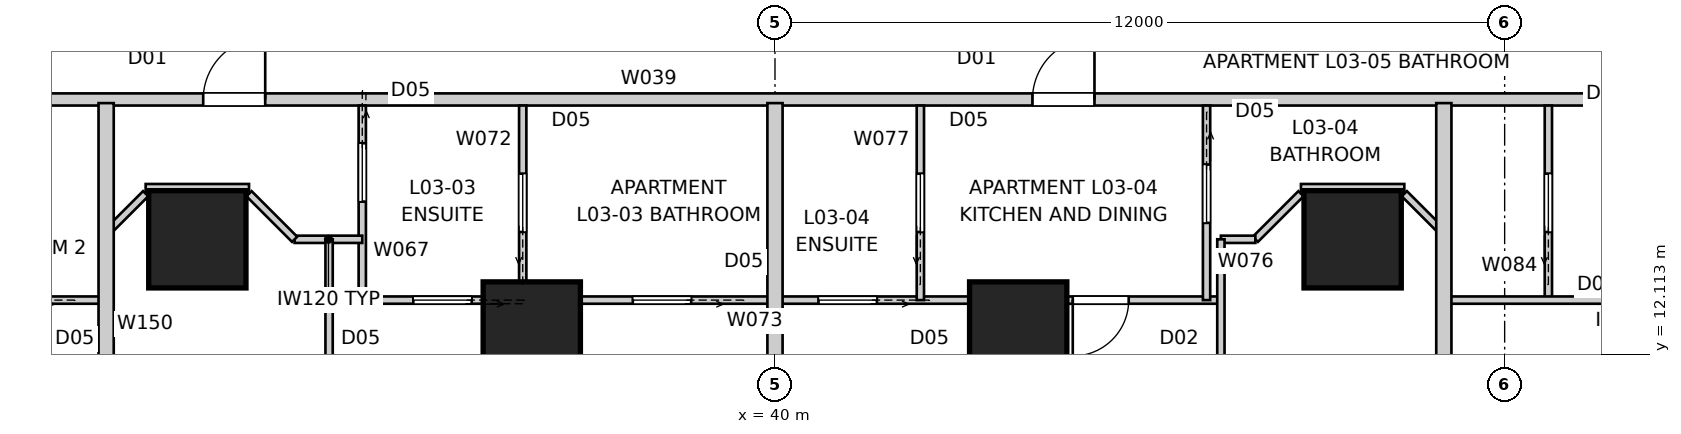
"""IFC4 building model, lengths in metres.
Left out: names, types, materials, properties, quantities, classifications, styles, units other than length and angle.
Written with IfcOpenShell. Run it as: python <this file> out.ifc"""

import sys

from ifc_helpers import new_model, si_unit, direction, frame, frame_2d, origin, origin_2d, place, context, subcontext, project, spatial, rectangle, extrude, element, fill, save


model = new_model("IFC4")
c1 = context("Model", 3, precision=1e-05, world=origin(), true_north=direction((0.0, 1.0)))
c2 = subcontext(c1, "Body", "Model", "MODEL_VIEW")
j1 = project(units=[si_unit("LENGTHUNIT", "METRE"), si_unit("PLANEANGLEUNIT", "RADIAN")], contexts=[c1])
p1 = place(None, origin())
s1 = spatial("IfcSite", under=j1, at=p1, CompositionType="ELEMENT")
p2 = place(p1, origin())
s2 = spatial("IfcBuilding", under=s1, at=p2, CompositionType="ELEMENT")
p3 = place(p2, frame((0.0, 0.0, 15.0)))
s3 = spatial("IfcBuildingStorey", under=s2, at=p3, CompositionType="ELEMENT", Elevation=15.0)
for number, where, z_axis, x_axis in (
    (1, (30.5, 14.0, 0.0), (0.0, 0.0, 1.0), (1.0, 0.0, 0.0)),
    (2, (36.0, 12.5, 0.0), (0.0, 0.0, 1.0), (1.0, 0.0, 0.0)),
    (3, (44.0, 12.5, 0.0), (0.0, 0.0, 1.0), (1.0, 0.0, 0.0)),
    (4, (49.5, 14.0, 0.0), (0.0, 0.0, 1.0), (1.0, 0.0, 0.0)),
):
    element("IfcColumn", number, at=place(p3, frame(where, z_axis=z_axis, x_axis=x_axis)), inside=s3, PredefinedType="COLUMN", context=c2, shape_type="SweptSolid", body=[
        extrude(rectangle(XDim=1.6, YDim=1.6, at=origin_2d()), origin(), (0.0, 0.0, 1.0), 3.4),
    ])
p4 = place(p3, frame((25.5, 16.3, 0.0), z_axis=(0.0, 0.0, 1.0), x_axis=(1.0, 0.0, 0.0)))
e5 = element("IfcWall", 5, at=p4, inside=s3, PredefinedType="PARTITIONING", context=c2, shape_type="SweptSolid", body=[
    extrude(rectangle(XDim=29.0, YDim=0.2, at=frame_2d((14.5, 0.0))), origin(), (0.0, 0.0, 1.0), 3.25),
])
p5 = place(p4, frame((18.734, 0.0, 0.0)))
e6 = element("IfcOpeningElement", 6, at=p5, cuts=e5, PredefinedType="OPENING", context=c2, shape_type="SweptSolid", body=[
    extrude(rectangle(XDim=1.02, YDim=2.34, at=frame_2d((0.51, 1.17))), frame((0.0, 0.11, 0.0), z_axis=(0.0, -1.0, 0.0), x_axis=(1.0, 0.0, 0.0)), (0.0, 0.0, 1.0), 0.22),
])
p6 = place(p4, frame((5.096, 0.0, 0.0)))
e7 = element("IfcOpeningElement", 7, at=p6, cuts=e5, PredefinedType="OPENING", context=c2, shape_type="SweptSolid", body=[
    extrude(rectangle(XDim=1.02, YDim=2.34, at=frame_2d((0.51, 1.17))), frame((0.0, 0.11, 0.0), z_axis=(0.0, -1.0, 0.0), x_axis=(1.0, 0.0, 0.0)), (0.0, 0.0, 1.0), 0.22),
])
p7 = place(p4, frame((0.815, 0.0, 0.0)))
e8 = element("IfcOpeningElement", 8, at=p7, cuts=e5, PredefinedType="OPENING", context=c2, shape_type="SweptSolid", body=[
    extrude(rectangle(XDim=1.02, YDim=2.1, at=frame_2d((0.51, 1.05))), frame((0.0, 0.11, 0.0), z_axis=(0.0, -1.0, 0.0), x_axis=(1.0, 0.0, 0.0)), (0.0, 0.0, 1.0), 0.22),
])
p8 = place(p3, frame((29.0, 4.0, 0.0), z_axis=(0.0, 0.0, 1.0), x_axis=(0.0, 1.0, 0.0)))
e9 = element("IfcWall", 9, at=p8, inside=s3, PredefinedType="PARTITIONING", context=c2, shape_type="SweptSolid", body=[
    extrude(rectangle(XDim=12.24, YDim=0.25, at=frame_2d((6.12, 0.0))), origin(), (0.0, 0.0, 1.0), 3.25),
])
p9 = place(p8, frame((4.04, 0.0, 0.0)))
e10 = element("IfcOpeningElement", 10, at=p9, cuts=e9, PredefinedType="OPENING", context=c2, shape_type="SweptSolid", body=[
    extrude(rectangle(XDim=0.92, YDim=2.34, at=frame_2d((0.46, 1.17))), frame((0.0, 0.135, 0.0), z_axis=(0.0, -1.0, 0.0), x_axis=(1.0, 0.0, 0.0)), (0.0, 0.0, 1.0), 0.27),
])
p10 = place(p3, frame((40.0, 4.0, 0.0), z_axis=(0.0, 0.0, 1.0), x_axis=(0.0, 1.0, 0.0)))
e11 = element("IfcWall", 11, at=p10, inside=s3, PredefinedType="PARTITIONING", context=c2, shape_type="SweptSolid", body=[
    extrude(rectangle(XDim=8.5, YDim=0.25, at=frame_2d((4.25, 0.0))), origin(), (0.0, 0.0, 1.0), 3.25),
])
p11 = place(p3, frame((40.0, 12.5, 0.0), z_axis=(0.0, 0.0, 1.0), x_axis=(0.0, 1.0, 0.0)))
e12 = element("IfcWall", 12, at=p11, inside=s3, PredefinedType="PARTITIONING", context=c2, shape_type="SweptSolid", body=[
    extrude(rectangle(XDim=3.74, YDim=0.25, at=frame_2d((1.87, 0.0))), origin(), (0.0, 0.0, 1.0), 2.796),
])
p12 = place(p3, frame((51.0, 4.0, 0.0), z_axis=(0.0, 0.0, 1.0), x_axis=(0.0, 1.0, 0.0)))
e13 = element("IfcWall", 13, at=p12, inside=s3, PredefinedType="PARTITIONING", context=c2, shape_type="SweptSolid", body=[
    extrude(rectangle(XDim=12.24, YDim=0.25, at=frame_2d((6.12, 0.0))), origin(), (0.0, 0.0, 1.0), 3.25),
])
p13 = place(p3, frame((29.0, 13.0, 0.0), z_axis=(0.0, 0.0, 1.0), x_axis=(-1.0, 0.0, 0.0)))
e14 = element("IfcWall", 14, at=p13, inside=s3, PredefinedType="PARTITIONING", context=c2, shape_type="SweptSolid", body=[
    extrude(rectangle(XDim=6.0, YDim=0.12, at=frame_2d((3.0, 0.0))), origin(), (0.0, 0.0, 1.0), 3.25),
])
p14 = place(p13, frame((1.378, 0.0, 0.0)))
e15 = element("IfcOpeningElement", 15, at=p14, cuts=e14, PredefinedType="OPENING", context=c2, shape_type="SweptSolid", body=[
    extrude(rectangle(XDim=0.96, YDim=2.1, at=frame_2d((0.48, 1.05))), frame((0.0, 0.07, 0.0), z_axis=(0.0, -1.0, 0.0), x_axis=(1.0, 0.0, 0.0)), (0.0, 0.0, 1.0), 0.14),
])
p15 = place(p3, frame((33.212, 16.2, 0.0), z_axis=(0.0, 0.0, 1.0), x_axis=(0.0, -1.0, 0.0)))
e16 = element("IfcWall", 16, at=p15, inside=s3, PredefinedType="PARTITIONING", context=c2, shape_type="SweptSolid", body=[
    extrude(rectangle(XDim=3.2, YDim=0.12, at=frame_2d((1.6, 0.0))), origin(), (0.0, 0.0, 1.0), 3.25),
])
p16 = place(p15, frame((0.62, 0.0, 0.0)))
e17 = element("IfcOpeningElement", 17, at=p16, cuts=e16, PredefinedType="OPENING", context=c2, shape_type="SweptSolid", body=[
    extrude(rectangle(XDim=0.96, YDim=2.1, at=frame_2d((0.48, 1.05))), frame((0.0, 0.07, 0.0), z_axis=(0.0, -1.0, 0.0), x_axis=(1.0, 0.0, 0.0)), (0.0, 0.0, 1.0), 0.14),
])
p17 = place(p3, frame((33.212, 14.0, 0.0), z_axis=(0.0, 0.0, 1.0), x_axis=(-1.0, 0.0, 0.0)))
e18 = element("IfcWall", 18, at=p17, inside=s3, PredefinedType="PARTITIONING", context=c2, shape_type="SweptSolid", body=[
    extrude(rectangle(XDim=1.112, YDim=0.12, at=frame_2d((0.556, 0.0))), origin(), (0.0, 0.0, 1.0), 3.25),
])
p18 = place(p3, frame((32.1, 14.0, 0.0), z_axis=(0.0, 0.0, 1.0), x_axis=(-0.707106781187, 0.707106781187, 0.0)))
e19 = element("IfcWall", 19, at=p18, inside=s3, PredefinedType="PARTITIONING", context=c2, shape_type="SweptSolid", body=[
    extrude(rectangle(XDim=1.061, YDim=0.12, at=frame_2d((0.53, 0.0))), origin(), (0.0, 0.0, 1.0), 3.25),
])
p19 = place(p3, frame((31.35, 14.85, 0.0), z_axis=(0.0, 0.0, 1.0), x_axis=(-1.0, 0.0, 0.0)))
e20 = element("IfcWall", 20, at=p19, inside=s3, PredefinedType="PARTITIONING", context=c2, shape_type="SweptSolid", body=[
    extrude(rectangle(XDim=1.7, YDim=0.12, at=frame_2d((0.85, 0.0))), origin(), (0.0, 0.0, 1.0), 3.25),
])
p20 = place(p3, frame((29.65, 14.75, 0.0), z_axis=(0.0, 0.0, 1.0), x_axis=(-0.707106781187, -0.707106781187, 0.0)))
e21 = element("IfcWall", 21, at=p20, inside=s3, PredefinedType="PARTITIONING", context=c2, shape_type="SweptSolid", body=[
    extrude(rectangle(XDim=0.919, YDim=0.12, at=frame_2d((0.459, 0.0))), origin(), (0.0, 0.0, 1.0), 3.25),
])
p21 = place(p3, frame((35.851, 13.0, 0.0), z_axis=(0.0, 0.0, 1.0), x_axis=(0.0, 1.0, 0.0)))
e22 = element("IfcWall", 22, at=p21, inside=s3, PredefinedType="PARTITIONING", context=c2, shape_type="SweptSolid", body=[
    extrude(rectangle(XDim=3.2, YDim=0.12, at=frame_2d((1.6, 0.0))), origin(), (0.0, 0.0, 1.0), 3.25),
])
p22 = place(p21, frame((1.12, 0.0, 0.0)))
e23 = element("IfcOpeningElement", 23, at=p22, cuts=e22, PredefinedType="OPENING", context=c2, shape_type="SweptSolid", body=[
    extrude(rectangle(XDim=0.96, YDim=2.1, at=frame_2d((0.48, 1.05))), frame((0.0, 0.07, 0.0), z_axis=(0.0, -1.0, 0.0), x_axis=(1.0, 0.0, 0.0)), (0.0, 0.0, 1.0), 0.14),
])
p23 = place(p3, frame((47.333, 13.0, 0.0), z_axis=(0.0, 0.0, 1.0), x_axis=(-1.0, 0.0, 0.0)))
e24 = element("IfcWall", 24, at=p23, inside=s3, PredefinedType="PARTITIONING", context=c2, shape_type="SweptSolid", body=[
    extrude(rectangle(XDim=14.121, YDim=0.12, at=frame_2d((7.061, 0.0))), origin(), (0.0, 0.0, 1.0), 2.549),
])
p24 = place(p23, frame((1.516, 0.0, 0.0)))
e25 = element("IfcOpeningElement", 25, at=p24, cuts=e24, PredefinedType="OPENING", context=c2, shape_type="SweptSolid", body=[
    extrude(rectangle(XDim=0.92, YDim=2.34, at=frame_2d((0.46, 1.17))), frame((0.0, 0.07, 0.0), z_axis=(0.0, -1.0, 0.0), x_axis=(1.0, 0.0, 0.0)), (0.0, 0.0, 1.0), 0.14),
])
p25 = place(p23, frame((5.658, 0.0, 0.0)))
e26 = element("IfcOpeningElement", 26, at=p25, cuts=e24, PredefinedType="OPENING", context=c2, shape_type="SweptSolid", body=[
    extrude(rectangle(XDim=0.96, YDim=2.1, at=frame_2d((0.48, 1.05))), frame((0.0, 0.07, 0.0), z_axis=(0.0, -1.0, 0.0), x_axis=(1.0, 0.0, 0.0)), (0.0, 0.0, 1.0), 0.14),
])
p26 = place(p23, frame((12.322, 0.0, 0.0)))
e27 = element("IfcOpeningElement", 27, at=p26, cuts=e24, PredefinedType="OPENING", context=c2, shape_type="SweptSolid", body=[
    extrude(rectangle(XDim=0.96, YDim=2.1, at=frame_2d((0.48, 1.05))), frame((0.0, 0.07, 0.0), z_axis=(0.0, -1.0, 0.0), x_axis=(1.0, 0.0, 0.0)), (0.0, 0.0, 1.0), 0.14),
])
p27 = place(p23, frame((8.712, 0.0, 0.0)))
e28 = element("IfcOpeningElement", 28, at=p27, cuts=e24, PredefinedType="OPENING", context=c2, shape_type="SweptSolid", body=[
    extrude(rectangle(XDim=0.96, YDim=2.1, at=frame_2d((0.48, 1.05))), frame((0.0, 0.07, 0.0), z_axis=(0.0, -1.0, 0.0), x_axis=(1.0, 0.0, 0.0)), (0.0, 0.0, 1.0), 0.14),
])
p28 = place(p3, frame((32.667, 14.0, 0.0), z_axis=(0.0, 0.0, 1.0), x_axis=(0.0, -1.0, 0.0)))
e29 = element("IfcWall", 29, at=p28, inside=s3, PredefinedType="PARTITIONING", context=c2, shape_type="SweptSolid", body=[
    extrude(rectangle(XDim=9.96, YDim=0.12, at=frame_2d((4.98, 0.0))), origin(), (0.0, 0.0, 1.0), 3.25),
])
p29 = place(p28, frame((4.54, 0.0, 0.0)))
e30 = element("IfcOpeningElement", 30, at=p29, cuts=e29, PredefinedType="OPENING", context=c2, shape_type="SweptSolid", body=[
    extrude(rectangle(XDim=0.92, YDim=2.34, at=frame_2d((0.46, 1.17))), frame((0.0, 0.07, 0.0), z_axis=(0.0, -1.0, 0.0), x_axis=(1.0, 0.0, 0.0)), (0.0, 0.0, 1.0), 0.14),
])
p30 = place(p3, frame((36.333, 4.04, 0.0), z_axis=(0.0, 0.0, 1.0), x_axis=(0.0, 1.0, 0.0)))
e31 = element("IfcWall", 31, at=p30, inside=s3, PredefinedType="PARTITIONING", context=c2, shape_type="SweptSolid", body=[
    extrude(rectangle(XDim=8.96, YDim=0.12, at=frame_2d((4.48, 0.0))), origin(), (0.0, 0.0, 1.0), 3.25),
])
p31 = place(p3, frame((47.098, 16.2, 0.0), z_axis=(0.0, 0.0, 1.0), x_axis=(0.0, -1.0, 0.0)))
e32 = element("IfcWall", 32, at=p31, inside=s3, PredefinedType="PARTITIONING", context=c2, shape_type="SweptSolid", body=[
    extrude(rectangle(XDim=3.2, YDim=0.12, at=frame_2d((1.6, 0.0))), origin(), (0.0, 0.0, 1.0), 3.25),
])
p32 = place(p31, frame((0.97, 0.0, 0.0)))
e33 = element("IfcOpeningElement", 33, at=p32, cuts=e32, PredefinedType="OPENING", context=c2, shape_type="SweptSolid", body=[
    extrude(rectangle(XDim=0.96, YDim=2.1, at=frame_2d((0.48, 1.05))), frame((0.0, 0.07, 0.0), z_axis=(0.0, -1.0, 0.0), x_axis=(1.0, 0.0, 0.0)), (0.0, 0.0, 1.0), 0.14),
])
p33 = place(p3, frame((42.391, 13.0, 0.0), z_axis=(0.0, 0.0, 1.0), x_axis=(0.0, 1.0, 0.0)))
e34 = element("IfcWall", 34, at=p33, inside=s3, PredefinedType="PARTITIONING", context=c2, shape_type="SweptSolid", body=[
    extrude(rectangle(XDim=3.2, YDim=0.12, at=frame_2d((1.6, 0.0))), origin(), (0.0, 0.0, 1.0), 3.25),
])
p34 = place(p33, frame((1.12, 0.0, 0.0)))
e35 = element("IfcOpeningElement", 35, at=p34, cuts=e34, PredefinedType="OPENING", context=c2, shape_type="SweptSolid", body=[
    extrude(rectangle(XDim=0.96, YDim=2.1, at=frame_2d((0.48, 1.05))), frame((0.0, 0.07, 0.0), z_axis=(0.0, -1.0, 0.0), x_axis=(1.0, 0.0, 0.0)), (0.0, 0.0, 1.0), 0.14),
])
p35 = place(p3, frame((51.0, 14.1, 0.0), z_axis=(0.0, 0.0, 1.0), x_axis=(-0.707106781187, 0.707106781187, 0.0)))
e36 = element("IfcWall", 36, at=p35, inside=s3, PredefinedType="PARTITIONING", context=c2, shape_type="SweptSolid", body=[
    extrude(rectangle(XDim=0.919, YDim=0.12, at=frame_2d((0.459, 0.0))), origin(), (0.0, 0.0, 1.0), 3.25),
])
p36 = place(p3, frame((50.35, 14.85, 0.0), z_axis=(0.0, 0.0, 1.0), x_axis=(-1.0, 0.0, 0.0)))
e37 = element("IfcWall", 37, at=p36, inside=s3, PredefinedType="PARTITIONING", context=c2, shape_type="SweptSolid", body=[
    extrude(rectangle(XDim=1.7, YDim=0.12, at=frame_2d((0.85, 0.0))), origin(), (0.0, 0.0, 1.0), 3.25),
])
p37 = place(p3, frame((48.65, 14.75, 0.0), z_axis=(0.0, 0.0, 1.0), x_axis=(-0.707106781187, -0.707106781187, 0.0)))
e38 = element("IfcWall", 38, at=p37, inside=s3, PredefinedType="PARTITIONING", context=c2, shape_type="SweptSolid", body=[
    extrude(rectangle(XDim=1.061, YDim=0.12, at=frame_2d((0.53, 0.0))), origin(), (0.0, 0.0, 1.0), 3.25),
])
p38 = place(p3, frame((47.9, 14.0, 0.0), z_axis=(0.0, 0.0, 1.0), x_axis=(-1.0, 0.0, 0.0)))
e39 = element("IfcWall", 39, at=p38, inside=s3, PredefinedType="PARTITIONING", context=c2, shape_type="SweptSolid", body=[
    extrude(rectangle(XDim=0.567, YDim=0.12, at=frame_2d((0.283, 0.0))), origin(), (0.0, 0.0, 1.0), 3.25),
])
p39 = place(p3, frame((47.333, 14.0, 0.0), z_axis=(0.0, 0.0, 1.0), x_axis=(0.0, -1.0, 0.0)))
e40 = element("IfcWall", 40, at=p39, inside=s3, PredefinedType="PARTITIONING", context=c2, shape_type="SweptSolid", body=[
    extrude(rectangle(XDim=9.96, YDim=0.12, at=frame_2d((4.98, 0.0))), origin(), (0.0, 0.0, 1.0), 3.25),
])
p40 = place(p39, frame((5.015, 0.0, 0.0)))
e41 = element("IfcOpeningElement", 41, at=p40, cuts=e40, PredefinedType="OPENING", context=c2, shape_type="SweptSolid", body=[
    extrude(rectangle(XDim=0.92, YDim=2.34, at=frame_2d((0.46, 1.17))), frame((0.0, 0.07, 0.0), z_axis=(0.0, -1.0, 0.0), x_axis=(1.0, 0.0, 0.0)), (0.0, 0.0, 1.0), 0.14),
])
p41 = place(p3, frame((43.667, 13.0, 0.0), z_axis=(0.0, 0.0, 1.0), x_axis=(0.0, -1.0, 0.0)))
e42 = element("IfcWall", 42, at=p41, inside=s3, PredefinedType="PARTITIONING", context=c2, shape_type="SweptSolid", body=[
    extrude(rectangle(XDim=8.96, YDim=0.12, at=frame_2d((4.48, 0.0))), origin(), (0.0, 0.0, 1.0), 3.25),
])
p42 = place(p3, frame((52.719, 13.0, 0.0), z_axis=(0.0, 0.0, 1.0), x_axis=(0.0, 1.0, 0.0)))
e43 = element("IfcWall", 43, at=p42, inside=s3, PredefinedType="PARTITIONING", context=c2, shape_type="SweptSolid", body=[
    extrude(rectangle(XDim=3.2, YDim=0.12, at=frame_2d((1.6, 0.0))), origin(), (0.0, 0.0, 1.0), 3.25),
])
p43 = place(p42, frame((1.12, 0.0, 0.0)))
e44 = element("IfcOpeningElement", 44, at=p43, cuts=e43, PredefinedType="OPENING", context=c2, shape_type="SweptSolid", body=[
    extrude(rectangle(XDim=0.96, YDim=2.1, at=frame_2d((0.48, 1.05))), frame((0.0, 0.07, 0.0), z_axis=(0.0, -1.0, 0.0), x_axis=(1.0, 0.0, 0.0)), (0.0, 0.0, 1.0), 0.14),
])
p44 = place(p3, frame((57.0, 13.0, 0.0), z_axis=(0.0, 0.0, 1.0), x_axis=(-1.0, 0.0, 0.0)))
e45 = element("IfcWall", 45, at=p44, inside=s3, PredefinedType="PARTITIONING", context=c2, shape_type="SweptSolid", body=[
    extrude(rectangle(XDim=6.0, YDim=0.12, at=frame_2d((3.0, 0.0))), origin(), (0.0, 0.0, 1.0), 3.25),
])
p45 = place(p5, origin())
e46 = element("IfcDoor", 46, at=p45, inside=s3, OperationType="SINGLE_SWING_RIGHT", PredefinedType="DOOR", context=c2, shape_type="SweptSolid", body=[
    extrude(rectangle(XDim=1.02, YDim=2.34, at=frame_2d((0.51, 1.17))), frame((0.0, 0.025, 0.0), z_axis=(0.0, -1.0, 0.0), x_axis=(1.0, 0.0, 0.0)), (0.0, 0.0, 1.0), 0.05),
])
fill(e6, e46)
p46 = place(p6, origin())
e47 = element("IfcDoor", 47, at=p46, inside=s3, OperationType="SINGLE_SWING_RIGHT", PredefinedType="DOOR", context=c2, shape_type="SweptSolid", body=[
    extrude(rectangle(XDim=1.02, YDim=2.34, at=frame_2d((0.51, 1.17))), frame((0.0, 0.025, 0.0), z_axis=(0.0, -1.0, 0.0), x_axis=(1.0, 0.0, 0.0)), (0.0, 0.0, 1.0), 0.05),
])
fill(e7, e47)
p47 = place(p24, origin())
e48 = element("IfcDoor", 48, at=p47, inside=s3, OperationType="SINGLE_SWING_RIGHT", PredefinedType="DOOR", context=c2, shape_type="SweptSolid", body=[
    extrude(rectangle(XDim=0.92, YDim=2.34, at=frame_2d((0.46, 1.17))), frame((0.0, 0.025, 0.0), z_axis=(0.0, -1.0, 0.0), x_axis=(1.0, 0.0, 0.0)), (0.0, 0.0, 1.0), 0.05),
])
fill(e25, e48)
p48 = place(p32, origin())
e49 = element("IfcDoor", 49, at=p48, inside=s3, OperationType="SLIDING_TO_LEFT", PredefinedType="DOOR", context=c2, shape_type="SweptSolid", body=[
    extrude(rectangle(XDim=0.96, YDim=2.1, at=frame_2d((0.48, 1.05))), frame((0.0, 0.025, 0.0), z_axis=(0.0, -1.0, 0.0), x_axis=(1.0, 0.0, 0.0)), (0.0, 0.0, 1.0), 0.05),
])
fill(e33, e49)
p49 = place(p34, origin())
e50 = element("IfcDoor", 50, at=p49, inside=s3, OperationType="SLIDING_TO_LEFT", PredefinedType="DOOR", context=c2, shape_type="SweptSolid", body=[
    extrude(rectangle(XDim=0.96, YDim=2.1, at=frame_2d((0.48, 1.05))), frame((0.0, 0.025, 0.0), z_axis=(0.0, -1.0, 0.0), x_axis=(1.0, 0.0, 0.0)), (0.0, 0.0, 1.0), 0.05),
])
fill(e35, e50)
p50 = place(p16, origin())
e51 = element("IfcDoor", 51, at=p50, inside=s3, OperationType="SLIDING_TO_LEFT", PredefinedType="DOOR", context=c2, shape_type="SweptSolid", body=[
    extrude(rectangle(XDim=0.96, YDim=2.1, at=frame_2d((0.48, 1.05))), frame((0.0, 0.025, 0.0), z_axis=(0.0, -1.0, 0.0), x_axis=(1.0, 0.0, 0.0)), (0.0, 0.0, 1.0), 0.05),
])
fill(e17, e51)
p51 = place(p43, origin())
e52 = element("IfcDoor", 52, at=p51, inside=s3, OperationType="SLIDING_TO_LEFT", PredefinedType="DOOR", context=c2, shape_type="SweptSolid", body=[
    extrude(rectangle(XDim=0.96, YDim=2.1, at=frame_2d((0.48, 1.05))), frame((0.0, 0.025, 0.0), z_axis=(0.0, -1.0, 0.0), x_axis=(1.0, 0.0, 0.0)), (0.0, 0.0, 1.0), 0.05),
])
fill(e44, e52)
p52 = place(p25, origin())
e53 = element("IfcDoor", 53, at=p52, inside=s3, OperationType="SLIDING_TO_LEFT", PredefinedType="DOOR", context=c2, shape_type="SweptSolid", body=[
    extrude(rectangle(XDim=0.96, YDim=2.1, at=frame_2d((0.48, 1.05))), frame((0.0, 0.025, 0.0), z_axis=(0.0, -1.0, 0.0), x_axis=(1.0, 0.0, 0.0)), (0.0, 0.0, 1.0), 0.05),
])
fill(e26, e53)
p53 = place(p22, origin())
e54 = element("IfcDoor", 54, at=p53, inside=s3, OperationType="SLIDING_TO_LEFT", PredefinedType="DOOR", context=c2, shape_type="SweptSolid", body=[
    extrude(rectangle(XDim=0.96, YDim=2.1, at=frame_2d((0.48, 1.05))), frame((0.0, 0.025, 0.0), z_axis=(0.0, -1.0, 0.0), x_axis=(1.0, 0.0, 0.0)), (0.0, 0.0, 1.0), 0.05),
])
fill(e23, e54)
p54 = place(p26, origin())
e55 = element("IfcDoor", 55, at=p54, inside=s3, OperationType="SLIDING_TO_LEFT", PredefinedType="DOOR", context=c2, shape_type="SweptSolid", body=[
    extrude(rectangle(XDim=0.96, YDim=2.1, at=frame_2d((0.48, 1.05))), frame((0.0, 0.025, 0.0), z_axis=(0.0, -1.0, 0.0), x_axis=(1.0, 0.0, 0.0)), (0.0, 0.0, 1.0), 0.05),
])
fill(e27, e55)
p55 = place(p27, origin())
e56 = element("IfcDoor", 56, at=p55, inside=s3, OperationType="SLIDING_TO_LEFT", PredefinedType="DOOR", context=c2, shape_type="SweptSolid", body=[
    extrude(rectangle(XDim=0.96, YDim=2.1, at=frame_2d((0.48, 1.05))), frame((0.0, 0.025, 0.0), z_axis=(0.0, -1.0, 0.0), x_axis=(1.0, 0.0, 0.0)), (0.0, 0.0, 1.0), 0.05),
])
fill(e28, e56)
save(model, sys.argv[1])
